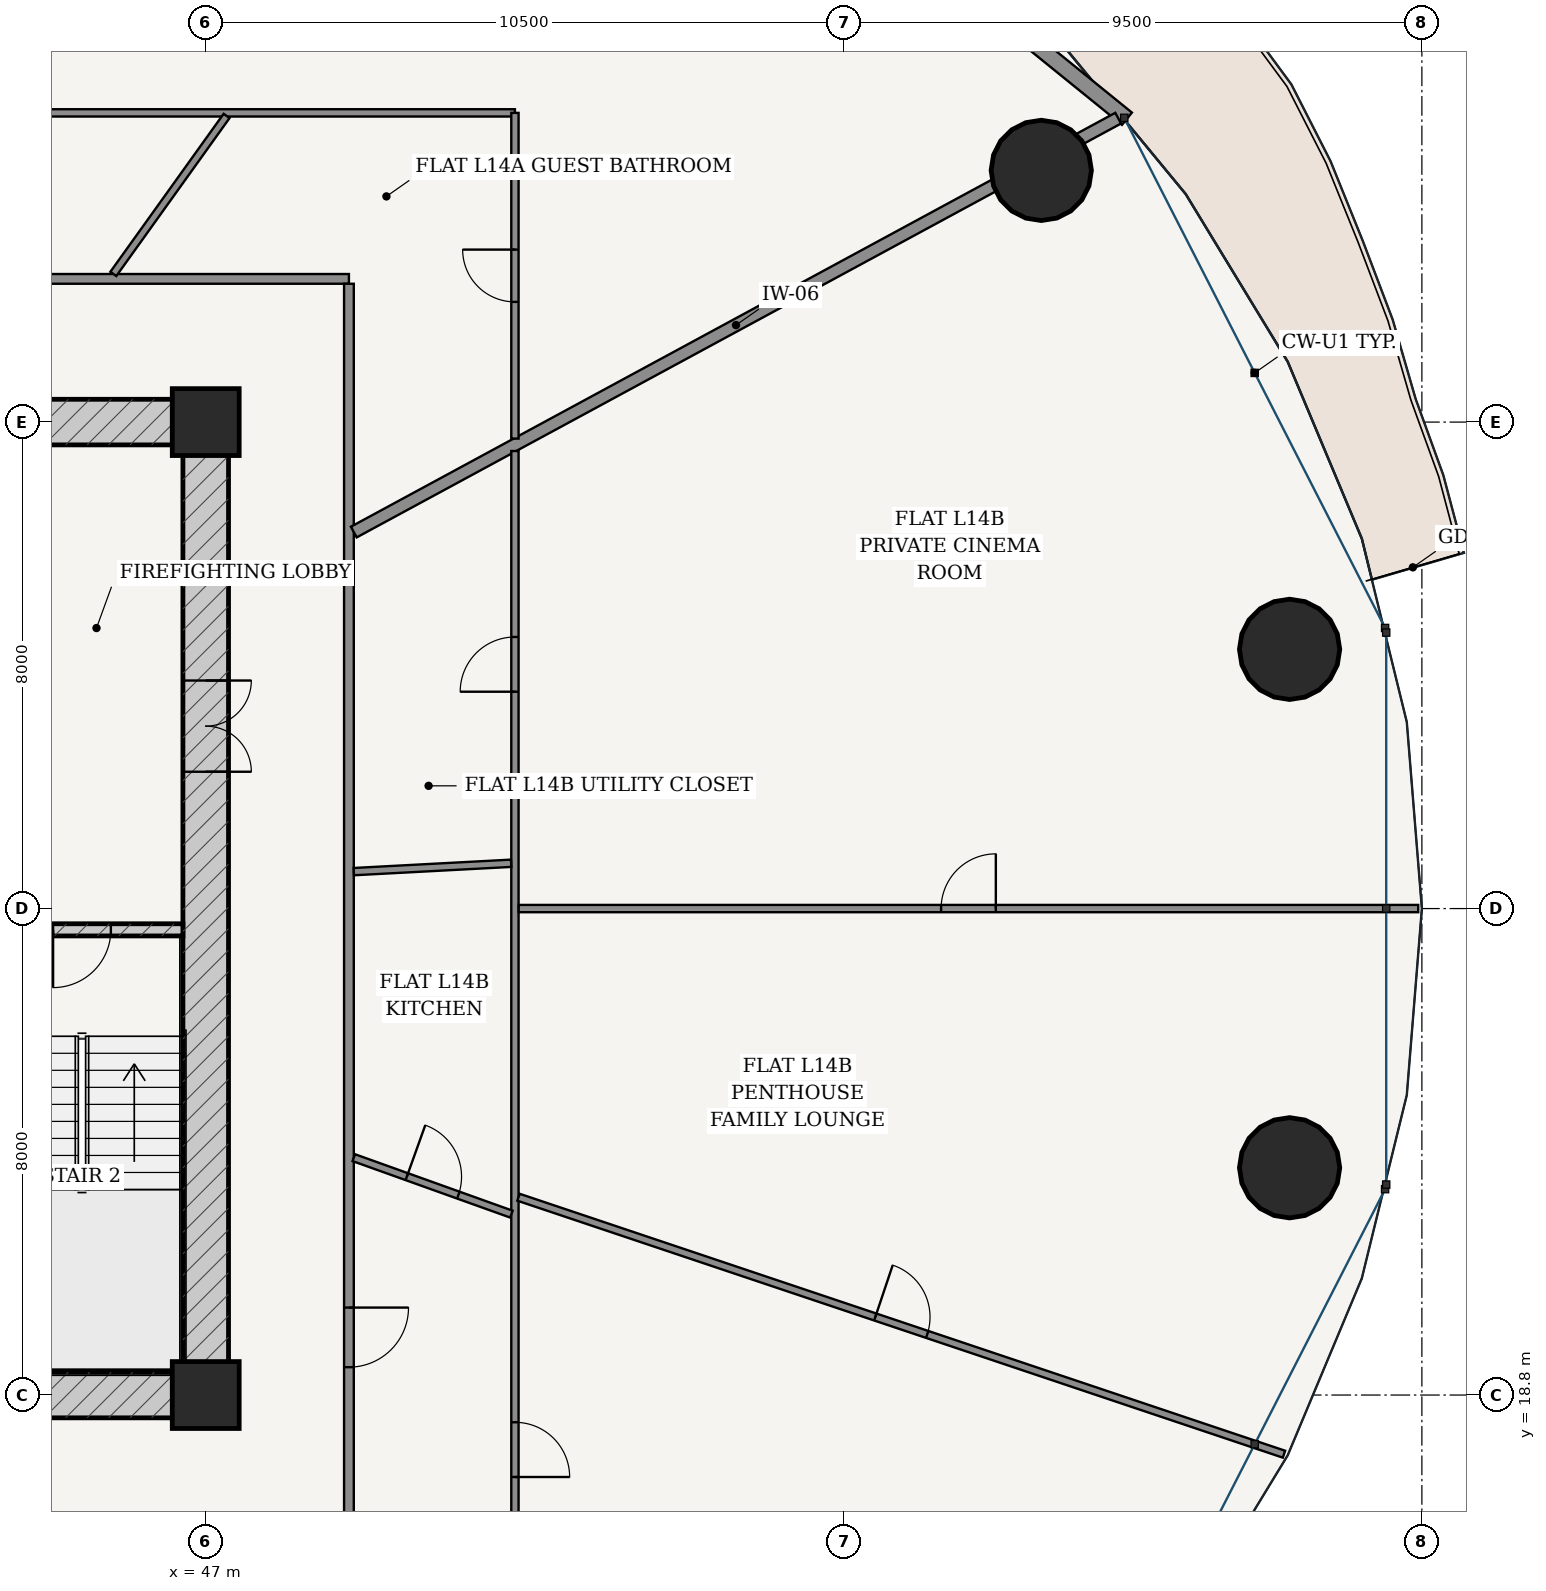
"""IFC4 building model, lengths in metres.
Left out: names, types, materials, properties, quantities, classifications, styles, units other than length and angle.
Written with IfcOpenShell. Run it as: python <this file> out.ifc"""

import sys

from ifc_helpers import new_model, si_unit, direction, frame, frame_2d, origin, origin_2d, place, context, subcontext, project, spatial, rectangle, hollow_circle, extrude, source, transform, mapped, element, fill, save


model = new_model("IFC4")
c1 = context("Model", 3, precision=1e-05, world=origin(), true_north=direction((-0.2419218956, 0.970295726276)))
c2 = subcontext(c1, "Body", "Model", "MODEL_VIEW")
j1 = project(units=[si_unit("LENGTHUNIT", "METRE"), si_unit("PLANEANGLEUNIT", "RADIAN")], contexts=[c1])
p1 = place(None, origin())
s1 = spatial("IfcSite", under=j1, at=p1, CompositionType="ELEMENT")
p2 = place(p1, origin())
s2 = spatial("IfcBuilding", under=s1, at=p2, CompositionType="ELEMENT")
p3 = place(p2, frame((0.0, 0.0, 56.4)))
s3 = spatial("IfcBuildingStorey", under=s2, at=p3, CompositionType="ELEMENT", Elevation=56.4)
for number, where, z_axis, x_axis in (
    (1, (47.0, 18.8, 0.0), (0.0, 0.0, 1.0), (1.0, 0.0, 0.0)),
    (2, (47.0, 34.8, 0.0), (0.0, 0.0, 1.0), (1.0, 0.0, 0.0)),
):
    element("IfcColumn", number, at=place(p3, frame(where, z_axis=z_axis, x_axis=x_axis)), inside=s3, PredefinedType="COLUMN", context=c2, shape_type="SweptSolid", body=[
        extrude(rectangle(XDim=1.1, YDim=1.1, at=origin_2d()), origin(), (0.0, 0.0, 1.0), 3.6),
    ])
p4 = place(p3, frame((28.625, 18.8, 0.0), z_axis=(0.0, 0.0, 1.0), x_axis=(1.0, 0.0, 0.0)))
e3 = element("IfcWall", 3, at=p4, inside=s3, PredefinedType="SHEAR", context=c2, shape_type="SweptSolid", body=[
    extrude(rectangle(XDim=18.75, YDim=0.75, at=frame_2d((9.375, 0.0))), origin(), (0.0, 0.0, 1.0), 3.32),
])
p5 = place(p4, frame((8.95, 0.0, 0.0)))
e4 = element("IfcOpeningElement", 4, at=p5, cuts=e3, PredefinedType="OPENING", context=c2, shape_type="SweptSolid", body=[
    extrude(rectangle(XDim=0.85, YDim=2.1, at=frame_2d((0.425, 1.05))), frame((0.0, 0.385, 0.0), z_axis=(0.0, -1.0, 0.0), x_axis=(1.0, 0.0, 0.0)), (0.0, 0.0, 1.0), 0.77),
])
p6 = place(p3, frame((28.625, 34.8, 0.0), z_axis=(0.0, 0.0, 1.0), x_axis=(1.0, 0.0, 0.0)))
e5 = element("IfcWall", 5, at=p6, inside=s3, PredefinedType="SHEAR", context=c2, shape_type="SweptSolid", body=[
    extrude(rectangle(XDim=18.75, YDim=0.75, at=frame_2d((9.375, 0.0))), origin(), (0.0, 0.0, 1.0), 3.32),
])
p7 = place(p6, frame((8.95, 0.0, 0.0)))
e6 = element("IfcOpeningElement", 6, at=p7, cuts=e5, PredefinedType="OPENING", context=c2, shape_type="SweptSolid", body=[
    extrude(rectangle(XDim=0.85, YDim=2.1, at=frame_2d((0.425, 1.05))), frame((0.0, 0.385, 0.0), z_axis=(0.0, -1.0, 0.0), x_axis=(1.0, 0.0, 0.0)), (0.0, 0.0, 1.0), 0.77),
])
p8 = place(p3, frame((47.0, 19.175, 0.0), z_axis=(0.0, 0.0, 1.0), x_axis=(0.0, 1.0, 0.0)))
e7 = element("IfcWall", 7, at=p8, inside=s3, PredefinedType="SHEAR", context=c2, shape_type="SweptSolid", body=[
    extrude(rectangle(XDim=15.25, YDim=0.75, at=frame_2d((7.625, 0.0))), origin(), (0.0, 0.0, 1.0), 3.32),
])
p9 = place(p8, frame((9.875, 0.0, 0.0)))
e8 = element("IfcOpeningElement", 8, at=p9, cuts=e7, PredefinedType="OPENING", context=c2, shape_type="SweptSolid", body=[
    extrude(rectangle(XDim=1.5, YDim=2.2, at=frame_2d((0.75, 1.1))), frame((0.0, 0.385, 0.0), z_axis=(0.0, -1.0, 0.0), x_axis=(1.0, 0.0, 0.0)), (0.0, 0.0, 1.0), 0.77),
])
p10 = place(p3, frame((43.305, 26.45, 0.0), z_axis=(0.0, 0.0, 1.0), x_axis=(1.0, 0.0, 0.0)))
e9 = element("IfcWall", 9, at=p10, inside=s3, PredefinedType="SOLIDWALL", context=c2, shape_type="SweptSolid", body=[
    extrude(rectangle(XDim=3.32, YDim=0.2, at=frame_2d((1.66, 0.0))), origin(), (0.0, 0.0, 1.0), 3.32),
])
p11 = place(p10, frame((1.185, 0.0, 0.0)))
e10 = element("IfcOpeningElement", 10, at=p11, cuts=e9, PredefinedType="OPENING", context=c2, shape_type="SweptSolid", body=[
    extrude(rectangle(XDim=0.95, YDim=2.15, at=frame_2d((0.475, 1.075))), frame((0.0, 0.11, 0.0), z_axis=(0.0, -1.0, 0.0), x_axis=(1.0, 0.0, 0.0)), (0.0, 0.0, 1.0), 0.22),
])
for number, where, z_axis, x_axis in (
    (11, (64.824, 31.063, 0.0), (0.0, 0.0, 1.0), (1.0, 0.0, 0.0)),
    (12, (60.741, 38.939, 0.0), (0.0, 0.0, 1.0), (1.0, 0.0, 0.0)),
    (13, (64.824, 22.537, 0.0), (0.0, 0.0, 1.0), (1.0, 0.0, 0.0)),
):
    element("IfcColumn", number, at=place(p3, frame(where, z_axis=z_axis, x_axis=x_axis)), inside=s3, PredefinedType="COLUMN", context=c2, shape_type="SweptSolid", body=[
        extrude(hollow_circle(Radius=0.825, WallThickness=0.05, at=origin_2d()), origin(), (0.0, 0.0, 1.0), 3.6),
    ])
p12 = place(p3, frame((62.15, 39.789, 0.0), z_axis=(0.0, 0.0, 1.0), x_axis=(-0.777005352078, 0.62949398952, 0.0)))
e14 = element("IfcWall", 14, at=p12, inside=s3, PredefinedType="SOLIDWALL", context=c2, shape_type="SweptSolid", body=[
    extrude(rectangle(XDim=10.447, YDim=0.26, at=frame_2d((5.223, 0.0))), origin(), (0.0, 0.0, 1.0), 3.32),
])
p13 = place(p12, frame((4.548, 0.0, 0.0)))
e15 = element("IfcOpeningElement", 15, at=p13, cuts=e14, PredefinedType="OPENING", context=c2, shape_type="SweptSolid", body=[
    extrude(rectangle(XDim=1.35, YDim=2.2, at=frame_2d((0.675, 1.1))), frame((0.0, 0.14, 0.0), z_axis=(0.0, -1.0, 0.0), x_axis=(1.0, 0.0, 0.0)), (0.0, 0.0, 1.0), 0.28),
])
p14 = place(p3, frame((26.645, 37.155, 0.0), z_axis=(0.0, 0.0, 1.0), x_axis=(1.0, 0.0, 0.0)))
e16 = element("IfcWall", 16, at=p14, inside=s3, PredefinedType="PARTITIONING", context=c2, shape_type="SweptSolid", body=[
    extrude(rectangle(XDim=22.71, YDim=0.16, at=frame_2d((11.355, 0.0))), origin(), (0.0, 0.0, 1.0), 2.688),
])
p15 = place(p3, frame((49.355, 16.525, 0.0), z_axis=(0.0, 0.0, 1.0), x_axis=(0.0, 1.0, 0.0)))
e17 = element("IfcWall", 17, at=p15, inside=s3, PredefinedType="PARTITIONING", context=c2, shape_type="SweptSolid", body=[
    extrude(rectangle(XDim=20.55, YDim=0.16, at=frame_2d((10.275, 0.0))), origin(), (0.0, 0.0, 1.0), 2.688),
])
p16 = place(p15, frame((2.733, 0.0, 0.0)))
e18 = element("IfcOpeningElement", 18, at=p16, cuts=e17, PredefinedType="OPENING", context=c2, shape_type="SweptSolid", body=[
    extrude(rectangle(XDim=0.98, YDim=2.2, at=frame_2d((0.49, 1.1))), frame((0.0, 0.09, 0.0), z_axis=(0.0, -1.0, 0.0), x_axis=(1.0, 0.0, 0.0)), (0.0, 0.0, 1.0), 0.18),
])
p17 = place(p3, frame((49.435, 32.991, 0.0), z_axis=(0.0, 0.0, 1.0), x_axis=(0.879369737803, 0.476139542819, 0.0)))
e19 = element("IfcWall", 19, at=p17, inside=s3, PredefinedType="PARTITIONING", context=c2, shape_type="SweptSolid", body=[
    extrude(rectangle(XDim=14.295, YDim=0.2, at=frame_2d((7.147, 0.0))), origin(), (0.0, 0.0, 1.0), 2.688),
])
p18 = place(p3, frame((23.915, 39.885, 0.0), z_axis=(0.0, 0.0, 1.0), x_axis=(1.0, 0.0, 0.0)))
e20 = element("IfcWall", 20, at=p18, inside=s3, PredefinedType="PARTITIONING", context=c2, shape_type="SweptSolid", body=[
    extrude(rectangle(XDim=28.17, YDim=0.12, at=frame_2d((14.085, 0.0))), origin(), (0.0, 0.0, 1.0), 2.688),
])
p19 = place(p18, frame((12.891, 0.0, 0.0)))
e21 = element("IfcOpeningElement", 21, at=p19, cuts=e20, PredefinedType="OPENING", context=c2, shape_type="SweptSolid", body=[
    extrude(rectangle(XDim=0.9, YDim=2.15, at=frame_2d((0.45, 1.075))), frame((0.0, 0.07, 0.0), z_axis=(0.0, -1.0, 0.0), x_axis=(1.0, 0.0, 0.0)), (0.0, 0.0, 1.0), 0.14),
])
p20 = place(p3, frame((52.085, 39.885, 0.0), z_axis=(0.0, 0.0, 1.0), x_axis=(0.0, -1.0, 0.0)))
e22 = element("IfcWall", 22, at=p20, inside=s3, PredefinedType="PARTITIONING", context=c2, shape_type="SweptSolid", body=[
    extrude(rectangle(XDim=5.357, YDim=0.12, at=frame_2d((2.678, 0.0))), origin(), (0.0, 0.0, 1.0), 2.999),
])
p21 = place(p20, frame((2.248, 0.0, 0.0)))
e23 = element("IfcOpeningElement", 23, at=p21, cuts=e22, PredefinedType="OPENING", context=c2, shape_type="SweptSolid", body=[
    extrude(rectangle(XDim=0.86, YDim=2.15, at=frame_2d((0.43, 1.075))), frame((0.0, 0.07, 0.0), z_axis=(0.0, -1.0, 0.0), x_axis=(1.0, 0.0, 0.0)), (0.0, 0.0, 1.0), 0.14),
])
p22 = place(p3, frame((45.481, 37.237, 0.0), z_axis=(0.0, 0.0, 1.0), x_axis=(0.582530715463, 0.812808689387, 0.0)))
e24 = element("IfcWall", 24, at=p22, inside=s3, PredefinedType="PARTITIONING", context=c2, shape_type="SweptSolid", body=[
    extrude(rectangle(XDim=3.197, YDim=0.12, at=frame_2d((1.598, 0.0))), origin(), (0.0, 0.0, 1.0), 3.32),
])
p23 = place(p3, frame((52.085, 34.324, 0.0), z_axis=(0.0, 0.0, 1.0), x_axis=(0.0, -1.0, 0.0)))
e25 = element("IfcWall", 25, at=p23, inside=s3, PredefinedType="PARTITIONING", context=c2, shape_type="SweptSolid", body=[
    extrude(rectangle(XDim=20.609, YDim=0.12, at=frame_2d((10.305, 0.0))), origin(), (0.0, 0.0, 1.0), 2.688),
])
p24 = place(p23, frame((15.972, 0.0, 0.0)))
e26 = element("IfcOpeningElement", 26, at=p24, cuts=e25, PredefinedType="OPENING", context=c2, shape_type="SweptSolid", body=[
    extrude(rectangle(XDim=0.9, YDim=2.15, at=frame_2d((0.45, 1.075))), frame((0.0, 0.07, 0.0), z_axis=(0.0, -1.0, 0.0), x_axis=(1.0, 0.0, 0.0)), (0.0, 0.0, 1.0), 0.14),
])
p25 = place(p23, frame((3.058, 0.0, 0.0)))
e27 = element("IfcOpeningElement", 27, at=p25, cuts=e25, PredefinedType="OPENING", context=c2, shape_type="SweptSolid", body=[
    extrude(rectangle(XDim=0.9, YDim=2.15, at=frame_2d((0.45, 1.075))), frame((0.0, 0.07, 0.0), z_axis=(0.0, -1.0, 0.0), x_axis=(1.0, 0.0, 0.0)), (0.0, 0.0, 1.0), 0.14),
])
p26 = place(p3, frame((52.144, 22.052, 0.0), z_axis=(0.0, 0.0, 1.0), x_axis=(0.948023034133, -0.318201707653, 0.0)))
e28 = element("IfcWall", 28, at=p26, inside=s3, PredefinedType="PARTITIONING", context=c2, shape_type="SweptSolid", body=[
    extrude(rectangle(XDim=13.279, YDim=0.12, at=frame_2d((6.639, 0.0))), origin(), (0.0, 0.0, 1.0), 2.762),
])
p27 = place(p26, frame((6.189, 0.0, 0.0)))
e29 = element("IfcOpeningElement", 29, at=p27, cuts=e28, PredefinedType="OPENING", context=c2, shape_type="SweptSolid", body=[
    extrude(rectangle(XDim=0.9, YDim=2.15, at=frame_2d((0.45, 1.075))), frame((0.0, 0.07, 0.0), z_axis=(0.0, -1.0, 0.0), x_axis=(1.0, 0.0, 0.0)), (0.0, 0.0, 1.0), 0.14),
])
p28 = place(p3, frame((52.147, 26.8, 0.0), z_axis=(0.0, 0.0, 1.0), x_axis=(1.0, 0.0, 0.0)))
e30 = element("IfcWall", 30, at=p28, inside=s3, PredefinedType="PARTITIONING", context=c2, shape_type="SweptSolid", body=[
    extrude(rectangle(XDim=14.793, YDim=0.12, at=frame_2d((7.396, 0.0))), origin(), (0.0, 0.0, 1.0), 2.762),
])
p29 = place(p28, frame((6.947, 0.0, 0.0)))
e31 = element("IfcOpeningElement", 31, at=p29, cuts=e30, PredefinedType="OPENING", context=c2, shape_type="SweptSolid", body=[
    extrude(rectangle(XDim=0.9, YDim=2.15, at=frame_2d((0.45, 1.075))), frame((0.0, 0.07, 0.0), z_axis=(0.0, -1.0, 0.0), x_axis=(1.0, 0.0, 0.0)), (0.0, 0.0, 1.0), 0.14),
])
p30 = place(p3, frame((49.435, 22.703, 0.0), z_axis=(0.0, 0.0, 1.0), x_axis=(0.941406362049, -0.337274460186, 0.0)))
e32 = element("IfcWall", 32, at=p30, inside=s3, PredefinedType="PARTITIONING", context=c2, shape_type="SweptSolid", body=[
    extrude(rectangle(XDim=2.753, YDim=0.12, at=frame_2d((1.376, 0.0))), origin(), (0.0, 0.0, 1.0), 3.32),
])
p31 = place(p30, frame((0.927, 0.0, 0.0)))
e33 = element("IfcOpeningElement", 33, at=p31, cuts=e32, PredefinedType="OPENING", context=c2, shape_type="SweptSolid", body=[
    extrude(rectangle(XDim=0.9, YDim=2.15, at=frame_2d((0.45, 1.075))), frame((0.0, 0.07, 0.0), z_axis=(0.0, -1.0, 0.0), x_axis=(1.0, 0.0, 0.0)), (0.0, 0.0, 1.0), 0.14),
])
p32 = place(p3, frame((49.435, 27.407, 0.0), z_axis=(0.0, 0.0, 1.0), x_axis=(0.998587742853, 0.053127392413, 0.0)))
e34 = element("IfcWall", 34, at=p32, inside=s3, PredefinedType="PARTITIONING", context=c2, shape_type="SweptSolid", body=[
    extrude(rectangle(XDim=2.592, YDim=0.12, at=frame_2d((1.296, 0.0))), origin(), (0.0, 0.0, 1.0), 3.32),
])
m1 = source(origin(), c2, "Body", "SweptSolid", [
    extrude(rectangle(XDim=1.5, YDim=2.2, at=frame_2d((0.75, 1.1))), frame((0.0, 0.025, 0.0), z_axis=(0.0, -1.0, 0.0), x_axis=(1.0, 0.0, 0.0)), (0.0, 0.0, 1.0), 0.05),
])
p33 = place(p9, frame((1.5, 0.0, 0.0), z_axis=(0.0, 0.0, 1.0), x_axis=(-1.0, 0.0, 0.0)))
e35 = element("IfcDoor", 35, at=p33, inside=s3, OperationType="DOUBLE_DOOR_SINGLE_SWING", PredefinedType="DOOR", context=c2, shape_type="MappedRepresentation", body=[
    mapped(m1, transform((0.0, 0.0, 0.0), scale=1.0)),
])
fill(e8, e35)
m2 = source(origin(), c2, "Body", "SweptSolid", [
    extrude(rectangle(XDim=0.95, YDim=2.15, at=frame_2d((0.475, 1.075))), frame((0.0, 0.025, 0.0), z_axis=(0.0, -1.0, 0.0), x_axis=(1.0, 0.0, 0.0)), (0.0, 0.0, 1.0), 0.05),
])
p34 = place(p11, frame((0.95, 0.0, 0.0), z_axis=(0.0, 0.0, 1.0), x_axis=(-1.0, 0.0, 0.0)))
e36 = element("IfcDoor", 36, at=p34, inside=s3, OperationType="SINGLE_SWING_RIGHT", PredefinedType="DOOR", context=c2, shape_type="MappedRepresentation", body=[
    mapped(m2, transform((0.0, 0.0, 0.0), scale=1.0)),
])
fill(e10, e36)
m3 = source(origin(), c2, "Body", "SweptSolid", [
    extrude(rectangle(XDim=0.86, YDim=2.15, at=frame_2d((0.43, 1.075))), frame((0.0, 0.025, 0.0), z_axis=(0.0, -1.0, 0.0), x_axis=(1.0, 0.0, 0.0)), (0.0, 0.0, 1.0), 0.05),
])
p35 = place(p21, frame((0.86, 0.0, 0.0), z_axis=(0.0, 0.0, 1.0), x_axis=(-1.0, 0.0, 0.0)))
e37 = element("IfcDoor", 37, at=p35, inside=s3, OperationType="SINGLE_SWING_RIGHT", PredefinedType="DOOR", context=c2, shape_type="MappedRepresentation", body=[
    mapped(m3, transform((0.0, 0.0, 0.0), scale=1.0)),
])
fill(e23, e37)
m4 = source(origin(), c2, "Body", "SweptSolid", [
    extrude(rectangle(XDim=0.98, YDim=2.2, at=frame_2d((0.49, 1.1))), frame((0.0, 0.025, 0.0), z_axis=(0.0, -1.0, 0.0), x_axis=(1.0, 0.0, 0.0)), (0.0, 0.0, 1.0), 0.05),
])
p36 = place(p16, frame((0.98, 0.0, 0.0), z_axis=(0.0, 0.0, 1.0), x_axis=(-1.0, 0.0, 0.0)))
e38 = element("IfcDoor", 38, at=p36, inside=s3, OperationType="SINGLE_SWING_LEFT", PredefinedType="DOOR", context=c2, shape_type="MappedRepresentation", body=[
    mapped(m4, transform((0.0, 0.0, 0.0), scale=1.0)),
])
fill(e18, e38)
m5 = source(origin(), c2, "Body", "SweptSolid", [
    extrude(rectangle(XDim=0.9, YDim=2.15, at=frame_2d((0.45, 1.075))), frame((0.0, 0.025, 0.0), z_axis=(0.0, -1.0, 0.0), x_axis=(1.0, 0.0, 0.0)), (0.0, 0.0, 1.0), 0.05),
])
p37 = place(p31, origin())
e39 = element("IfcDoor", 39, at=p37, inside=s3, OperationType="SINGLE_SWING_LEFT", PredefinedType="DOOR", context=c2, shape_type="MappedRepresentation", body=[
    mapped(m5, transform((0.0, 0.0, 0.0), scale=1.0)),
])
fill(e33, e39)
p38 = place(p24, origin())
e40 = element("IfcDoor", 40, at=p38, inside=s3, OperationType="SINGLE_SWING_RIGHT", PredefinedType="DOOR", context=c2, shape_type="MappedRepresentation", body=[
    mapped(m5, transform((0.0, 0.0, 0.0), scale=1.0)),
])
fill(e26, e40)
p39 = place(p27, origin())
e41 = element("IfcDoor", 41, at=p39, inside=s3, OperationType="SINGLE_SWING_LEFT", PredefinedType="DOOR", context=c2, shape_type="MappedRepresentation", body=[
    mapped(m5, transform((0.0, 0.0, 0.0), scale=1.0)),
])
fill(e29, e41)
p40 = place(p29, origin())
e42 = element("IfcDoor", 42, at=p40, inside=s3, OperationType="SINGLE_SWING_RIGHT", PredefinedType="DOOR", context=c2, shape_type="MappedRepresentation", body=[
    mapped(m5, transform((0.0, 0.0, 0.0), scale=1.0)),
])
fill(e31, e42)
p41 = place(p25, frame((0.9, 0.0, 0.0), z_axis=(0.0, 0.0, 1.0), x_axis=(-1.0, 0.0, 0.0)))
e43 = element("IfcDoor", 43, at=p41, inside=s3, OperationType="SINGLE_SWING_LEFT", PredefinedType="DOOR", context=c2, shape_type="MappedRepresentation", body=[
    mapped(m5, transform((0.0, 0.0, 0.0), scale=1.0)),
])
fill(e27, e43)
save(model, sys.argv[1])
